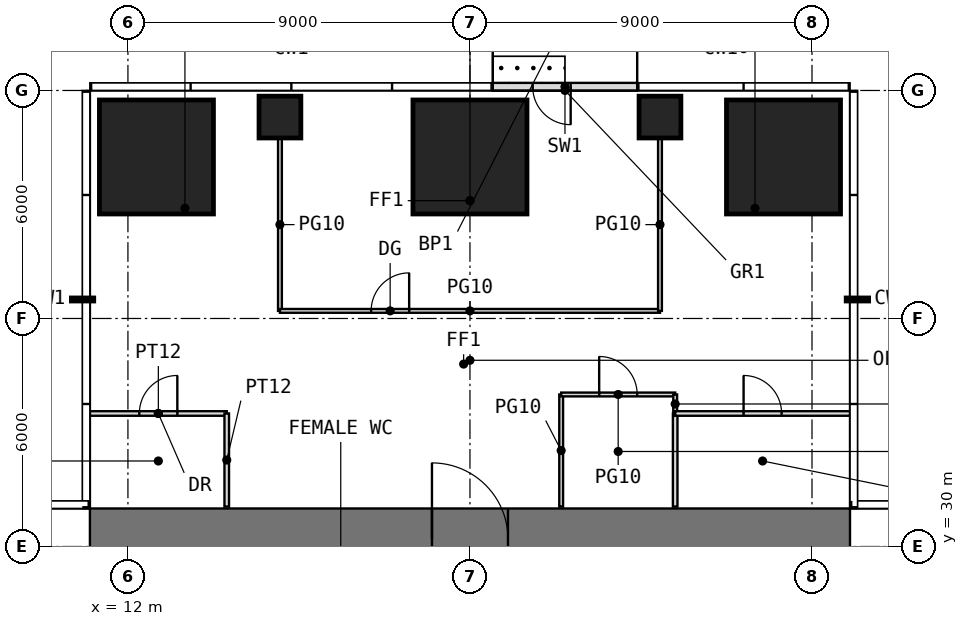
"""IFC4 building model, lengths in metres.
Left out: names, types, materials, properties, quantities, classifications, styles, units other than length and angle.
Written with IfcOpenShell. Run it as: python <this file> out.ifc"""

import sys

from ifc_helpers import new_model, si_unit, direction, frame, frame_2d, origin, origin_2d, place, context, subcontext, project, spatial, rectangle, extrude, element, fill, save


model = new_model("IFC4")
c1 = context("Model", 3, precision=1e-05, world=origin(), true_north=direction((0.0, 1.0)))
c2 = subcontext(c1, "Body", "Model", "MODEL_VIEW")
j1 = project(units=[si_unit("LENGTHUNIT", "METRE"), si_unit("PLANEANGLEUNIT", "RADIAN")], contexts=[c1])
p1 = place(None, origin())
s1 = spatial("IfcSite", under=j1, at=p1, CompositionType="ELEMENT")
p2 = place(p1, origin())
s2 = spatial("IfcBuilding", under=s1, at=p2, CompositionType="ELEMENT")
p3 = place(p2, frame((0.0, 0.0, 136.5)))
s3 = spatial("IfcBuildingStorey", under=s2, at=p3, CompositionType="ELEMENT", Elevation=136.5)
p4 = place(p3, frame((12.75, 40.25, 0.0), z_axis=(0.0, 0.0, 1.0), x_axis=(1.0, 0.0, 0.0)))
e1 = element("IfcColumn", 1, at=p4, inside=s3, PredefinedType="COLUMN", context=c2, shape_type="SweptSolid", body=[
    extrude(rectangle(XDim=3.0, YDim=3.0, at=origin_2d()), origin(), (0.0, 0.0, 1.0), 4.0),
])
p5 = place(p3, frame((16.0, 41.3, 0.0), z_axis=(0.0, 0.0, 1.0), x_axis=(1.0, 0.0, 0.0)))
e2 = element("IfcColumn", 2, at=p5, inside=s3, PredefinedType="COLUMN", context=c2, shape_type="SweptSolid", body=[
    extrude(rectangle(XDim=1.1, YDim=1.1, at=origin_2d()), origin(), (0.0, 0.0, 1.0), 4.0),
])
p6 = place(p3, frame((21.0, 40.25, 0.0), z_axis=(0.0, 0.0, 1.0), x_axis=(1.0, 0.0, 0.0)))
e3 = element("IfcColumn", 3, at=p6, inside=s3, PredefinedType="COLUMN", context=c2, shape_type="SweptSolid", body=[
    extrude(rectangle(XDim=3.0, YDim=3.0, at=origin_2d()), origin(), (0.0, 0.0, 1.0), 4.0),
])
p7 = place(p3, frame((26.0, 41.3, 0.0), z_axis=(0.0, 0.0, 1.0), x_axis=(1.0, 0.0, 0.0)))
e4 = element("IfcColumn", 4, at=p7, inside=s3, PredefinedType="COLUMN", context=c2, shape_type="SweptSolid", body=[
    extrude(rectangle(XDim=1.1, YDim=1.1, at=origin_2d()), origin(), (0.0, 0.0, 1.0), 4.0),
])
p8 = place(p3, frame((29.25, 40.25, 0.0), z_axis=(0.0, 0.0, 1.0), x_axis=(1.0, 0.0, 0.0)))
e5 = element("IfcColumn", 5, at=p8, inside=s3, PredefinedType="COLUMN", context=c2, shape_type="SweptSolid", body=[
    extrude(rectangle(XDim=3.0, YDim=3.0, at=origin_2d()), origin(), (0.0, 0.0, 1.0), 4.0),
])
p9 = place(p3, frame((25.4, 42.1, 0.0), z_axis=(0.0, 0.0, 1.0), x_axis=(-1.0, 0.0, 0.0)))
e6 = element("IfcWall", 6, at=p9, inside=s3, PredefinedType="USERDEFINED", context=c2, shape_type="SweptSolid", body=[
    extrude(rectangle(XDim=3.8, YDim=0.2, at=frame_2d((1.9, 0.0))), origin(), (0.0, 0.0, 1.0), 3.75),
])
p10 = place(p9, frame((1.75, 0.0, 0.0)))
e7 = element("IfcOpeningElement", 7, at=p10, cuts=e6, PredefinedType="OPENING", context=c2, shape_type="SweptSolid", body=[
    extrude(rectangle(XDim=1.0, YDim=2.4, at=frame_2d((0.5, 1.2))), frame((0.0, 0.11, 0.0), z_axis=(0.0, -1.0, 0.0), x_axis=(1.0, 0.0, 0.0)), (0.0, 0.0, 1.0), 0.22),
])
p11 = place(p3, frame((11.0, 30.2, -0.05), z_axis=(0.0, 0.0, 1.0), x_axis=(1.0, 0.0, 0.0)))
e8 = element("IfcWall", 8, at=p11, inside=s3, PredefinedType="SHEAR", context=c2, shape_type="SweptSolid", body=[
    extrude(rectangle(XDim=20.0, YDim=1.6, at=frame_2d((10.0, 0.0))), origin(), (0.0, 0.0, 1.0), 4.0),
])
p12 = place(p11, frame((9.0, 0.0, 0.05)))
e9 = element("IfcOpeningElement", 9, at=p12, cuts=e8, PredefinedType="OPENING", context=c2, shape_type="SweptSolid", body=[
    extrude(rectangle(XDim=2.0, YDim=2.2, at=frame_2d((1.0, 1.1))), frame((0.0, 0.81, 0.0), z_axis=(0.0, -1.0, 0.0), x_axis=(1.0, 0.0, 0.0)), (0.0, 0.0, 1.0), 1.62),
])
p13 = place(p3, frame((11.0, 33.5, 0.0), z_axis=(0.0, 0.0, 1.0), x_axis=(1.0, 0.0, 0.0)))
e10 = element("IfcWall", 10, at=p13, inside=s3, PredefinedType="PARTITIONING", context=c2, shape_type="SweptSolid", body=[
    extrude(rectangle(XDim=3.6, YDim=0.12, at=frame_2d((1.8, 0.0))), origin(), (0.0, 0.0, 1.0), 3.75),
])
p14 = place(p13, frame((1.3, 0.0, 0.0)))
e11 = element("IfcOpeningElement", 11, at=p14, cuts=e10, PredefinedType="OPENING", context=c2, shape_type="SweptSolid", body=[
    extrude(rectangle(XDim=1.0, YDim=2.2, at=frame_2d((0.5, 1.1))), frame((0.0, 0.07, 0.0), z_axis=(0.0, -1.0, 0.0), x_axis=(1.0, 0.0, 0.0)), (0.0, 0.0, 1.0), 0.14),
])
p15 = place(p3, frame((14.6, 31.05, 0.0), z_axis=(0.0, 0.0, 1.0), x_axis=(0.0, 1.0, 0.0)))
e12 = element("IfcWall", 12, at=p15, inside=s3, PredefinedType="PARTITIONING", context=c2, shape_type="SweptSolid", body=[
    extrude(rectangle(XDim=2.45, YDim=0.12, at=frame_2d((1.225, 0.0))), origin(), (0.0, 0.0, 1.0), 3.75),
])
p16 = place(p3, frame((16.0, 36.2, 0.0), z_axis=(0.0, 0.0, 1.0), x_axis=(0.0, 1.0, 0.0)))
e13 = element("IfcWall", 13, at=p16, inside=s3, PredefinedType="PARTITIONING", context=c2, shape_type="SweptSolid", body=[
    extrude(rectangle(XDim=4.54, YDim=0.1, at=frame_2d((2.27, 0.0))), origin(), (0.0, 0.0, 1.0), 3.75),
])
p17 = place(p3, frame((16.0, 36.2, 0.0), z_axis=(0.0, 0.0, 1.0), x_axis=(1.0, 0.0, 0.0)))
e14 = element("IfcWall", 14, at=p17, inside=s3, PredefinedType="PARTITIONING", context=c2, shape_type="SweptSolid", body=[
    extrude(rectangle(XDim=10.0, YDim=0.1, at=frame_2d((5.0, 0.0))), origin(), (0.0, 0.0, 1.0), 3.75),
])
p18 = place(p17, frame((2.4, 0.0, 0.0)))
e15 = element("IfcOpeningElement", 15, at=p18, cuts=e14, PredefinedType="OPENING", context=c2, shape_type="SweptSolid", body=[
    extrude(rectangle(XDim=1.0, YDim=2.4, at=frame_2d((0.5, 1.2))), frame((0.0, 0.06, 0.0), z_axis=(0.0, -1.0, 0.0), x_axis=(1.0, 0.0, 0.0)), (0.0, 0.0, 1.0), 0.12),
])
p19 = place(p3, frame((23.4, 31.05, 0.0), z_axis=(0.0, 0.0, 1.0), x_axis=(0.0, 1.0, 0.0)))
e16 = element("IfcWall", 16, at=p19, inside=s3, PredefinedType="PARTITIONING", context=c2, shape_type="SweptSolid", body=[
    extrude(rectangle(XDim=2.95, YDim=0.1, at=frame_2d((1.475, 0.0))), origin(), (0.0, 0.0, 1.0), 3.75),
])
p20 = place(p3, frame((23.4, 34.0, 0.0), z_axis=(0.0, 0.0, 1.0), x_axis=(1.0, 0.0, 0.0)))
e17 = element("IfcWall", 17, at=p20, inside=s3, PredefinedType="PARTITIONING", context=c2, shape_type="SweptSolid", body=[
    extrude(rectangle(XDim=3.0, YDim=0.1, at=frame_2d((1.5, 0.0))), origin(), (0.0, 0.0, 1.0), 3.75),
])
p21 = place(p20, frame((1.0, 0.0, 0.0)))
e18 = element("IfcOpeningElement", 18, at=p21, cuts=e17, PredefinedType="OPENING", context=c2, shape_type="SweptSolid", body=[
    extrude(rectangle(XDim=1.0, YDim=2.4, at=frame_2d((0.5, 1.2))), frame((0.0, 0.06, 0.0), z_axis=(0.0, -1.0, 0.0), x_axis=(1.0, 0.0, 0.0)), (0.0, 0.0, 1.0), 0.12),
])
p22 = place(p3, frame((26.0, 36.2, 0.0), z_axis=(0.0, 0.0, 1.0), x_axis=(0.0, 1.0, 0.0)))
e19 = element("IfcWall", 19, at=p22, inside=s3, PredefinedType="PARTITIONING", context=c2, shape_type="SweptSolid", body=[
    extrude(rectangle(XDim=4.54, YDim=0.1, at=frame_2d((2.27, 0.0))), origin(), (0.0, 0.0, 1.0), 3.75),
])
p23 = place(p3, frame((26.4, 31.05, 0.0), z_axis=(0.0, 0.0, 1.0), x_axis=(0.0, 1.0, 0.0)))
e20 = element("IfcWall", 20, at=p23, inside=s3, PredefinedType="PARTITIONING", context=c2, shape_type="SweptSolid", body=[
    extrude(rectangle(XDim=2.45, YDim=0.12, at=frame_2d((1.225, 0.0))), origin(), (0.0, 0.0, 1.0), 3.75),
])
p24 = place(p3, frame((26.4, 33.5, 0.0), z_axis=(0.0, 0.0, 1.0), x_axis=(0.0, 1.0, 0.0)))
e21 = element("IfcWall", 21, at=p24, inside=s3, PredefinedType="PARTITIONING", context=c2, shape_type="SweptSolid", body=[
    extrude(rectangle(XDim=0.5, YDim=0.1, at=frame_2d((0.25, 0.0))), origin(), (0.0, 0.0, 1.0), 3.75),
])
p25 = place(p3, frame((26.4, 33.5, 0.0), z_axis=(0.0, 0.0, 1.0), x_axis=(1.0, 0.0, 0.0)))
e22 = element("IfcWall", 22, at=p25, inside=s3, PredefinedType="PARTITIONING", context=c2, shape_type="SweptSolid", body=[
    extrude(rectangle(XDim=4.6, YDim=0.12, at=frame_2d((2.3, 0.0))), origin(), (0.0, 0.0, 1.0), 3.75),
])
p26 = place(p25, frame((1.8, 0.0, 0.0)))
e23 = element("IfcOpeningElement", 23, at=p26, cuts=e22, PredefinedType="OPENING", context=c2, shape_type="SweptSolid", body=[
    extrude(rectangle(XDim=1.0, YDim=2.2, at=frame_2d((0.5, 1.1))), frame((0.0, 0.07, 0.0), z_axis=(0.0, -1.0, 0.0), x_axis=(1.0, 0.0, 0.0)), (0.0, 0.0, 1.0), 0.14),
])
p27 = place(p10, origin())
e24 = element("IfcDoor", 24, at=p27, inside=s3, OperationType="SINGLE_SWING_LEFT", PredefinedType="DOOR", context=c2, shape_type="SweptSolid", body=[
    extrude(rectangle(XDim=1.0, YDim=2.4, at=frame_2d((0.5, 1.2))), frame((0.0, 0.025, 0.0), z_axis=(0.0, -1.0, 0.0), x_axis=(1.0, 0.0, 0.0)), (0.0, 0.0, 1.0), 0.05),
])
fill(e7, e24)
p28 = place(p12, origin())
e25 = element("IfcDoor", 25, at=p28, inside=s3, OperationType="DOUBLE_DOOR_SINGLE_SWING", PredefinedType="DOOR", context=c2, shape_type="SweptSolid", body=[
    extrude(rectangle(XDim=2.0, YDim=2.2, at=frame_2d((1.0, 1.1))), frame((0.0, 0.025, 0.0), z_axis=(0.0, -1.0, 0.0), x_axis=(1.0, 0.0, 0.0)), (0.0, 0.0, 1.0), 0.05),
])
fill(e9, e25)
p29 = place(p14, origin())
e26 = element("IfcDoor", 26, at=p29, inside=s3, OperationType="SINGLE_SWING_RIGHT", PredefinedType="DOOR", context=c2, shape_type="SweptSolid", body=[
    extrude(rectangle(XDim=1.0, YDim=2.2, at=frame_2d((0.5, 1.1))), frame((0.0, 0.025, 0.0), z_axis=(0.0, -1.0, 0.0), x_axis=(1.0, 0.0, 0.0)), (0.0, 0.0, 1.0), 0.05),
])
fill(e11, e26)
p30 = place(p21, origin())
e27 = element("IfcDoor", 27, at=p30, inside=s3, OperationType="SINGLE_SWING_LEFT", PredefinedType="DOOR", context=c2, shape_type="SweptSolid", body=[
    extrude(rectangle(XDim=1.0, YDim=2.4, at=frame_2d((0.5, 1.2))), frame((0.0, 0.025, 0.0), z_axis=(0.0, -1.0, 0.0), x_axis=(1.0, 0.0, 0.0)), (0.0, 0.0, 1.0), 0.05),
])
fill(e18, e27)
p31 = place(p26, origin())
e28 = element("IfcDoor", 28, at=p31, inside=s3, OperationType="SINGLE_SWING_LEFT", PredefinedType="DOOR", context=c2, shape_type="SweptSolid", body=[
    extrude(rectangle(XDim=1.0, YDim=2.2, at=frame_2d((0.5, 1.1))), frame((0.0, 0.025, 0.0), z_axis=(0.0, -1.0, 0.0), x_axis=(1.0, 0.0, 0.0)), (0.0, 0.0, 1.0), 0.05),
])
fill(e23, e28)
p32 = place(p18, origin())
e29 = element("IfcDoor", 29, at=p32, inside=s3, OperationType="SINGLE_SWING_RIGHT", PredefinedType="DOOR", context=c2, shape_type="SweptSolid", body=[
    extrude(rectangle(XDim=1.0, YDim=2.4, at=frame_2d((0.5, 1.2))), frame((0.0, 0.025, 0.0), z_axis=(0.0, -1.0, 0.0), x_axis=(1.0, 0.0, 0.0)), (0.0, 0.0, 1.0), 0.05),
])
fill(e15, e29)
save(model, sys.argv[1])
